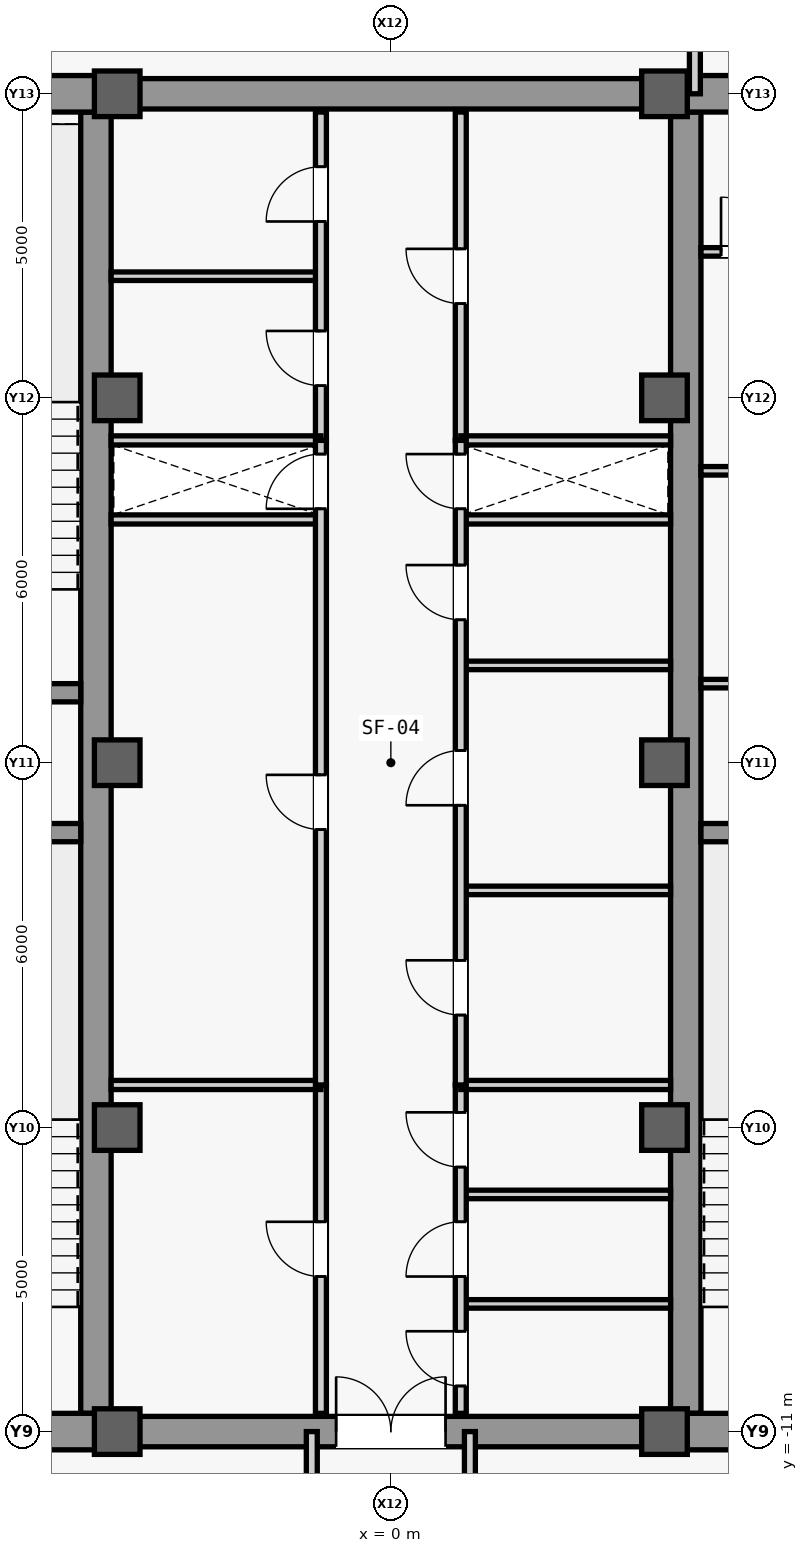
"""IFC4 building model, lengths in metres.
Left out: names, types, materials, properties, quantities, classifications, styles, units other than length and angle.
Written with IfcOpenShell. Run it as: python <this file> out.ifc"""

import sys

from ifc_helpers import new_model, si_unit, direction, frame, frame_2d, origin, origin_2d, place, context, subcontext, project, spatial, rectangle, extrude, source, transform, mapped, element, fill, save


model = new_model("IFC4")
c1 = context("Model", 3, precision=1e-05, world=origin(), true_north=direction((0.0, 1.0)))
c2 = subcontext(c1, "Body", "Model", "MODEL_VIEW")
j1 = project(units=[si_unit("LENGTHUNIT", "METRE"), si_unit("PLANEANGLEUNIT", "RADIAN")], contexts=[c1])
p1 = place(None, origin())
s1 = spatial("IfcSite", under=j1, at=p1, CompositionType="ELEMENT")
p2 = place(p1, origin())
s2 = spatial("IfcBuilding", under=s1, at=p2, CompositionType="ELEMENT")
p3 = place(p2, frame((0.0, 0.0, 317.5)))
s3 = spatial("IfcBuildingStorey", under=s2, at=p3, CompositionType="ELEMENT", Elevation=317.5)
m1 = source(origin(), c2, "Body", "SweptSolid", [
    extrude(rectangle(XDim=21.4, YDim=0.5, at=frame_2d((10.7, 0.0))), origin(), (0.0, 0.0, 1.0), 3.78),
])
for number, where, z_axis, x_axis in (
    (1, (-4.85, -10.7, 0.0), (0.0, 0.0, 1.0), (0.0, 1.0, 0.0)),
    (2, (4.85, -10.7, 0.0), (0.0, 0.0, 1.0), (0.0, 1.0, 0.0)),
):
    element("IfcWall", number, at=place(p3, frame(where, z_axis=z_axis, x_axis=x_axis)), inside=s3, PredefinedType="SHEAR", context=c2, shape_type="MappedRepresentation", body=[
        mapped(m1, transform((0.0, 0.0, 0.0), scale=1.0)),
    ])
m2 = source(origin(), c2, "Body", "SweptSolid", [
    extrude(rectangle(XDim=5.9, YDim=0.6, at=frame_2d((2.95, 0.0))), origin(), (0.0, 0.0, 1.0), 3.78),
])
for number, where, z_axis, x_axis in (
    (3, (-10.75, -11.0, 0.0), (0.0, 0.0, 1.0), (1.0, 0.0, 0.0)),
    (4, (-10.75, 11.0, 0.0), (0.0, 0.0, 1.0), (1.0, 0.0, 0.0)),
    (5, (4.85, -11.0, 0.0), (0.0, 0.0, 1.0), (1.0, 0.0, 0.0)),
):
    element("IfcWall", number, at=place(p3, frame(where, z_axis=z_axis, x_axis=x_axis)), inside=s3, PredefinedType="SHEAR", context=c2, shape_type="MappedRepresentation", body=[
        mapped(m2, transform((0.0, 0.0, 0.0), scale=1.0)),
    ])
p4 = place(p3, frame((4.85, 11.0, 0.0), z_axis=(0.0, 0.0, 1.0), x_axis=(1.0, 0.0, 0.0)))
e6 = element("IfcWall", 6, at=p4, inside=s3, PredefinedType="SHEAR", context=c2, shape_type="MappedRepresentation", body=[
    mapped(m2, transform((0.0, 0.0, 0.0), scale=1.0)),
])
m3 = source(origin(), c2, "Body", "SweptSolid", [
    extrude(rectangle(XDim=1.05, YDim=2.2, at=frame_2d((0.525, 1.1))), frame((0.0, 0.31, 0.0), z_axis=(0.0, -1.0, 0.0), x_axis=(1.0, 0.0, 0.0)), (0.0, 0.0, 1.0), 0.62),
])
p5 = place(p4, frame((1.375, 0.0, 0.0)))
e7 = element("IfcOpeningElement", 7, at=p5, cuts=e6, PredefinedType="OPENING", context=c2, shape_type="MappedRepresentation", body=[
    mapped(m3, transform((0.0, 0.0, 0.0), scale=1.0)),
])
m4 = source(origin(), c2, "Body", "SweptSolid", [
    extrude(rectangle(XDim=5.65, YDim=0.3, at=frame_2d((2.825, 0.0))), origin(), (0.0, 0.0, 1.0), 3.78),
])
for number, where, z_axis, x_axis in (
    (8, (-10.75, -1.15, 0.0), (0.0, 0.0, 1.0), (1.0, 0.0, 0.0)),
    (9, (-10.75, 1.15, 0.0), (0.0, 0.0, 1.0), (1.0, 0.0, 0.0)),
    (10, (5.1, -1.15, 0.0), (0.0, 0.0, 1.0), (1.0, 0.0, 0.0)),
):
    element("IfcWall", number, at=place(p3, frame(where, z_axis=z_axis, x_axis=x_axis)), inside=s3, PredefinedType="SHEAR", context=c2, shape_type="MappedRepresentation", body=[
        mapped(m4, transform((0.0, 0.0, 0.0), scale=1.0)),
    ])
m5 = source(origin(), c2, "Body", "SweptSolid", [
    extrude(rectangle(XDim=9.2, YDim=0.5, at=frame_2d((4.6, 0.0))), origin(), (0.0, 0.0, 1.0), 3.78),
])
p6 = place(p3, frame((-4.6, -11.0, 0.0), z_axis=(0.0, 0.0, 1.0), x_axis=(1.0, 0.0, 0.0)))
e11 = element("IfcWall", 11, at=p6, inside=s3, PredefinedType="SHEAR", context=c2, shape_type="MappedRepresentation", body=[
    mapped(m5, transform((0.0, 0.0, 0.0), scale=1.0)),
])
m6 = source(origin(), c2, "Body", "SweptSolid", [
    extrude(rectangle(XDim=1.8, YDim=2.25, at=frame_2d((0.9, 1.125))), frame((0.0, 0.26, 0.0), z_axis=(0.0, -1.0, 0.0), x_axis=(1.0, 0.0, 0.0)), (0.0, 0.0, 1.0), 0.52),
])
p7 = place(p6, frame((3.7, 0.0, 0.0)))
e12 = element("IfcOpeningElement", 12, at=p7, cuts=e11, PredefinedType="OPENING", context=c2, shape_type="MappedRepresentation", body=[
    mapped(m6, transform((0.0, 0.0, 0.0), scale=1.0)),
])
p8 = place(p3, frame((-4.6, 11.0, 0.0), z_axis=(0.0, 0.0, 1.0), x_axis=(1.0, 0.0, 0.0)))
e13 = element("IfcWall", 13, at=p8, inside=s3, PredefinedType="SHEAR", context=c2, shape_type="MappedRepresentation", body=[
    mapped(m5, transform((0.0, 0.0, 0.0), scale=1.0)),
])
m7 = source(origin(), c2, "Body", "SweptSolid", [
    extrude(rectangle(XDim=0.75, YDim=0.75, at=origin_2d()), origin(), (0.0, 0.0, 1.0), 4.0),
])
for number, where, z_axis, x_axis in (
    (14, (-4.5, -11.0, 0.0), (0.0, 0.0, 1.0), (1.0, 0.0, 0.0)),
    (15, (-4.5, -6.0, 0.0), (0.0, 0.0, 1.0), (1.0, 0.0, 0.0)),
    (16, (-4.5, 0.0, 0.0), (0.0, 0.0, 1.0), (1.0, 0.0, 0.0)),
    (17, (-4.5, 6.0, 0.0), (0.0, 0.0, 1.0), (1.0, 0.0, 0.0)),
    (18, (-4.5, 11.0, 0.0), (0.0, 0.0, 1.0), (1.0, 0.0, 0.0)),
    (19, (4.5, -11.0, 0.0), (0.0, 0.0, 1.0), (1.0, 0.0, 0.0)),
    (20, (4.5, -6.0, 0.0), (0.0, 0.0, 1.0), (1.0, 0.0, 0.0)),
    (21, (4.5, 0.0, 0.0), (0.0, 0.0, 1.0), (1.0, 0.0, 0.0)),
    (22, (4.5, 6.0, 0.0), (0.0, 0.0, 1.0), (1.0, 0.0, 0.0)),
    (23, (4.5, 11.0, 0.0), (0.0, 0.0, 1.0), (1.0, 0.0, 0.0)),
):
    element("IfcColumn", number, at=place(p3, frame(where, z_axis=z_axis, x_axis=x_axis)), inside=s3, PredefinedType="COLUMN", context=c2, shape_type="MappedRepresentation", body=[
        mapped(m7, transform((0.0, 0.0, 0.0), scale=1.0)),
    ])
m8 = source(origin(), c2, "Body", "SweptSolid", [
    extrude(rectangle(XDim=3.15, YDim=0.14, at=frame_2d((1.575, 0.0))), origin(), (0.0, 0.0, 1.0), 3.78),
])
p9 = place(p3, frame((5.1, 1.3, 0.0), z_axis=(0.0, 0.0, 1.0), x_axis=(1.0, 0.0, 0.0)))
e24 = element("IfcWall", 24, at=p9, inside=s3, PredefinedType="PARTITIONING", context=c2, shape_type="MappedRepresentation", body=[
    mapped(m8, transform((0.0, 0.0, 0.0), scale=1.0)),
])
p10 = place(p3, frame((5.1, 8.4, 0.0), z_axis=(0.0, 0.0, 1.0), x_axis=(1.0, 0.0, 0.0)))
e25 = element("IfcWall", 25, at=p10, inside=s3, PredefinedType="PARTITIONING", context=c2, shape_type="MappedRepresentation", body=[
    mapped(m8, transform((0.0, 0.0, 0.0), scale=1.0)),
])
m9 = source(origin(), c2, "Body", "SweptSolid", [
    extrude(rectangle(XDim=0.9, YDim=2.15, at=frame_2d((0.45, 1.075))), frame((0.0, 0.08, 0.0), z_axis=(0.0, -1.0, 0.0), x_axis=(1.0, 0.0, 0.0)), (0.0, 0.0, 1.0), 0.16),
])
p11 = place(p10, frame((0.33, 0.0, 0.0)))
e26 = element("IfcOpeningElement", 26, at=p11, cuts=e25, PredefinedType="OPENING", context=c2, shape_type="MappedRepresentation", body=[
    mapped(m9, transform((0.0, 0.0, 0.0), scale=1.0)),
])
p12 = place(p10, frame((1.9, 0.0, 0.0)))
e27 = element("IfcOpeningElement", 27, at=p12, cuts=e25, PredefinedType="OPENING", context=c2, shape_type="MappedRepresentation", body=[
    mapped(m9, transform((0.0, 0.0, 0.0), scale=1.0)),
])
m10 = source(origin(), c2, "Body", "SweptSolid", [
    extrude(rectangle(XDim=1.55, YDim=0.14, at=frame_2d((0.775, 0.0))), origin(), (0.0, 0.0, 1.0), 3.78),
])
p13 = place(p3, frame((5.1, 4.8, 0.0), z_axis=(0.0, 0.0, 1.0), x_axis=(1.0, 0.0, 0.0)))
e28 = element("IfcWall", 28, at=p13, inside=s3, PredefinedType="PARTITIONING", context=c2, shape_type="MappedRepresentation", body=[
    mapped(m10, transform((0.0, 0.0, 0.0), scale=1.0)),
])
m11 = source(origin(), c2, "Body", "SweptSolid", [
    extrude(rectangle(XDim=3.45, YDim=0.15, at=frame_2d((1.725, 0.0))), origin(), (0.0, 0.0, 1.0), 3.78),
])
for number, where, z_axis, x_axis in (
    (29, (-4.6, 4.0, 0.0), (0.0, 0.0, 1.0), (1.0, 0.0, 0.0)),
    (30, (1.15, 4.0, 0.0), (0.0, 0.0, 1.0), (1.0, 0.0, 0.0)),
):
    element("IfcWall", number, at=place(p3, frame(where, z_axis=z_axis, x_axis=x_axis)), inside=s3, PredefinedType="PARTITIONING", context=c2, shape_type="MappedRepresentation", body=[
        mapped(m11, transform((0.0, 0.0, 0.0), scale=1.0)),
    ])
m12 = source(origin(), c2, "Body", "SweptSolid", [
    extrude(rectangle(XDim=5.4, YDim=0.18, at=frame_2d((2.7, 0.0))), origin(), (0.0, 0.0, 1.0), 3.78),
])
p14 = place(p3, frame((-1.15, -10.7, 0.0), z_axis=(0.0, 0.0, 1.0), x_axis=(0.0, 1.0, 0.0)))
e31 = element("IfcWall", 31, at=p14, inside=s3, PredefinedType="PARTITIONING", context=c2, shape_type="MappedRepresentation", body=[
    mapped(m12, transform((0.0, 0.0, 0.0), scale=1.0)),
])
m13 = source(origin(), c2, "Body", "SweptSolid", [
    extrude(rectangle(XDim=0.9, YDim=2.15, at=frame_2d((0.45, 1.075))), frame((0.0, 0.1, 0.0), z_axis=(0.0, -1.0, 0.0), x_axis=(1.0, 0.0, 0.0)), (0.0, 0.0, 1.0), 0.2),
])
p15 = place(p14, frame((2.25, 0.0, 0.0)))
e32 = element("IfcOpeningElement", 32, at=p15, cuts=e31, PredefinedType="OPENING", context=c2, shape_type="MappedRepresentation", body=[
    mapped(m13, transform((0.0, 0.0, 0.0), scale=1.0)),
])
m14 = source(origin(), c2, "Body", "SweptSolid", [
    extrude(rectangle(XDim=3.45, YDim=0.14, at=frame_2d((1.725, 0.0))), origin(), (0.0, 0.0, 1.0), 3.78),
])
for number, where, z_axis, x_axis in (
    (33, (1.15, -8.9, 0.0), (0.0, 0.0, 1.0), (1.0, 0.0, 0.0)),
    (34, (1.15, -7.1, 0.0), (0.0, 0.0, 1.0), (1.0, 0.0, 0.0)),
):
    element("IfcWall", number, at=place(p3, frame(where, z_axis=z_axis, x_axis=x_axis)), inside=s3, PredefinedType="PARTITIONING", context=c2, shape_type="MappedRepresentation", body=[
        mapped(m14, transform((0.0, 0.0, 0.0), scale=1.0)),
    ])
p16 = place(p3, frame((1.15, -10.7, 0.0), z_axis=(0.0, 0.0, 1.0), x_axis=(0.0, 1.0, 0.0)))
e35 = element("IfcWall", 35, at=p16, inside=s3, PredefinedType="PARTITIONING", context=c2, shape_type="MappedRepresentation", body=[
    mapped(m12, transform((0.0, 0.0, 0.0), scale=1.0)),
])
p17 = place(p16, frame((0.45, 0.0, 0.0)))
e36 = element("IfcOpeningElement", 36, at=p17, cuts=e35, PredefinedType="OPENING", context=c2, shape_type="MappedRepresentation", body=[
    mapped(m13, transform((0.0, 0.0, 0.0), scale=1.0)),
])
p18 = place(p16, frame((2.25, 0.0, 0.0)))
e37 = element("IfcOpeningElement", 37, at=p18, cuts=e35, PredefinedType="OPENING", context=c2, shape_type="MappedRepresentation", body=[
    mapped(m13, transform((0.0, 0.0, 0.0), scale=1.0)),
])
p19 = place(p16, frame((4.05, 0.0, 0.0)))
e38 = element("IfcOpeningElement", 38, at=p19, cuts=e35, PredefinedType="OPENING", context=c2, shape_type="MappedRepresentation", body=[
    mapped(m13, transform((0.0, 0.0, 0.0), scale=1.0)),
])
for number, where, z_axis, x_axis in (
    (39, (-4.6, -5.3, 0.0), (0.0, 0.0, 1.0), (1.0, 0.0, 0.0)),
    (40, (1.15, -5.3, 0.0), (0.0, 0.0, 1.0), (1.0, 0.0, 0.0)),
):
    element("IfcWall", number, at=place(p3, frame(where, z_axis=z_axis, x_axis=x_axis)), inside=s3, PredefinedType="PARTITIONING", context=c2, shape_type="MappedRepresentation", body=[
        mapped(m11, transform((0.0, 0.0, 0.0), scale=1.0)),
    ])
p20 = place(p3, frame((-4.6, 8.0, 0.0), z_axis=(0.0, 0.0, 1.0), x_axis=(1.0, 0.0, 0.0)))
e41 = element("IfcWall", 41, at=p20, inside=s3, PredefinedType="PARTITIONING", context=c2, shape_type="MappedRepresentation", body=[
    mapped(m14, transform((0.0, 0.0, 0.0), scale=1.0)),
])
p21 = place(p3, frame((-1.15, 5.3, 0.0), z_axis=(0.0, 0.0, 1.0), x_axis=(0.0, 1.0, 0.0)))
e42 = element("IfcWall", 42, at=p21, inside=s3, PredefinedType="PARTITIONING", context=c2, shape_type="MappedRepresentation", body=[
    mapped(m12, transform((0.0, 0.0, 0.0), scale=1.0)),
])
p22 = place(p21, frame((0.9, 0.0, 0.0)))
e43 = element("IfcOpeningElement", 43, at=p22, cuts=e42, PredefinedType="OPENING", context=c2, shape_type="MappedRepresentation", body=[
    mapped(m13, transform((0.0, 0.0, 0.0), scale=1.0)),
])
p23 = place(p21, frame((3.6, 0.0, 0.0)))
e44 = element("IfcOpeningElement", 44, at=p23, cuts=e42, PredefinedType="OPENING", context=c2, shape_type="MappedRepresentation", body=[
    mapped(m13, transform((0.0, 0.0, 0.0), scale=1.0)),
])
p24 = place(p3, frame((1.15, 5.3, 0.0), z_axis=(0.0, 0.0, 1.0), x_axis=(0.0, 1.0, 0.0)))
e45 = element("IfcWall", 45, at=p24, inside=s3, PredefinedType="PARTITIONING", context=c2, shape_type="MappedRepresentation", body=[
    mapped(m12, transform((0.0, 0.0, 0.0), scale=1.0)),
])
p25 = place(p24, frame((2.25, 0.0, 0.0)))
e46 = element("IfcOpeningElement", 46, at=p25, cuts=e45, PredefinedType="OPENING", context=c2, shape_type="MappedRepresentation", body=[
    mapped(m13, transform((0.0, 0.0, 0.0), scale=1.0)),
])
for number, where, z_axis, x_axis in (
    (47, (-4.6, 5.3, 0.0), (0.0, 0.0, 1.0), (1.0, 0.0, 0.0)),
    (48, (1.15, 5.3, 0.0), (0.0, 0.0, 1.0), (1.0, 0.0, 0.0)),
):
    element("IfcWall", number, at=place(p3, frame(where, z_axis=z_axis, x_axis=x_axis)), inside=s3, PredefinedType="PARTITIONING", context=c2, shape_type="MappedRepresentation", body=[
        mapped(m11, transform((0.0, 0.0, 0.0), scale=1.0)),
    ])
m15 = source(origin(), c2, "Body", "SweptSolid", [
    extrude(rectangle(XDim=10.6, YDim=0.18, at=frame_2d((5.3, 0.0))), origin(), (0.0, 0.0, 1.0), 3.78),
])
p26 = place(p3, frame((-1.15, -5.3, 0.0), z_axis=(0.0, 0.0, 1.0), x_axis=(0.0, 1.0, 0.0)))
e49 = element("IfcWall", 49, at=p26, inside=s3, PredefinedType="PARTITIONING", context=c2, shape_type="MappedRepresentation", body=[
    mapped(m15, transform((0.0, 0.0, 0.0), scale=1.0)),
])
p27 = place(p26, frame((4.2, 0.0, 0.0)))
e50 = element("IfcOpeningElement", 50, at=p27, cuts=e49, PredefinedType="OPENING", context=c2, shape_type="MappedRepresentation", body=[
    mapped(m13, transform((0.0, 0.0, 0.0), scale=1.0)),
])
p28 = place(p26, frame((9.475, 0.0, 0.0)))
e51 = element("IfcOpeningElement", 51, at=p28, cuts=e49, PredefinedType="OPENING", context=c2, shape_type="MappedRepresentation", body=[
    mapped(m13, transform((0.0, 0.0, 0.0), scale=1.0)),
])
for number, where, z_axis, x_axis in (
    (52, (1.15, -2.1, 0.0), (0.0, 0.0, 1.0), (1.0, 0.0, 0.0)),
    (53, (1.15, 1.6, 0.0), (0.0, 0.0, 1.0), (1.0, 0.0, 0.0)),
):
    element("IfcWall", number, at=place(p3, frame(where, z_axis=z_axis, x_axis=x_axis)), inside=s3, PredefinedType="PARTITIONING", context=c2, shape_type="MappedRepresentation", body=[
        mapped(m14, transform((0.0, 0.0, 0.0), scale=1.0)),
    ])
p29 = place(p3, frame((1.15, -5.3, 0.0), z_axis=(0.0, 0.0, 1.0), x_axis=(0.0, 1.0, 0.0)))
e54 = element("IfcWall", 54, at=p29, inside=s3, PredefinedType="PARTITIONING", context=c2, shape_type="MappedRepresentation", body=[
    mapped(m15, transform((0.0, 0.0, 0.0), scale=1.0)),
])
p30 = place(p29, frame((1.15, 0.0, 0.0)))
e55 = element("IfcOpeningElement", 55, at=p30, cuts=e54, PredefinedType="OPENING", context=c2, shape_type="MappedRepresentation", body=[
    mapped(m13, transform((0.0, 0.0, 0.0), scale=1.0)),
])
p31 = place(p29, frame((4.6, 0.0, 0.0)))
e56 = element("IfcOpeningElement", 56, at=p31, cuts=e54, PredefinedType="OPENING", context=c2, shape_type="MappedRepresentation", body=[
    mapped(m13, transform((0.0, 0.0, 0.0), scale=1.0)),
])
p32 = place(p29, frame((7.65, 0.0, 0.0)))
e57 = element("IfcOpeningElement", 57, at=p32, cuts=e54, PredefinedType="OPENING", context=c2, shape_type="MappedRepresentation", body=[
    mapped(m13, transform((0.0, 0.0, 0.0), scale=1.0)),
])
p33 = place(p29, frame((9.475, 0.0, 0.0)))
e58 = element("IfcOpeningElement", 58, at=p33, cuts=e54, PredefinedType="OPENING", context=c2, shape_type="MappedRepresentation", body=[
    mapped(m13, transform((0.0, 0.0, 0.0), scale=1.0)),
])
m16 = source(origin(), c2, "Body", "SweptSolid", [
    extrude(rectangle(XDim=4.6, YDim=0.18, at=frame_2d((2.3, 0.0))), origin(), (0.0, 0.0, 1.0), 3.78),
])
for number, where, z_axis, x_axis in (
    (59, (-1.3, -15.6, 0.0), (0.0, 0.0, 1.0), (0.0, 1.0, 0.0)),
    (60, (1.3, -15.6, 0.0), (0.0, 0.0, 1.0), (0.0, 1.0, 0.0)),
):
    element("IfcWall", number, at=place(p3, frame(where, z_axis=z_axis, x_axis=x_axis)), inside=s3, PredefinedType="PARTITIONING", context=c2, shape_type="MappedRepresentation", body=[
        mapped(m16, transform((0.0, 0.0, 0.0), scale=1.0)),
    ])
m17 = source(origin(), c2, "Body", "SweptSolid", [
    extrude(rectangle(XDim=2.6, YDim=0.18, at=frame_2d((1.3, 0.0))), origin(), (0.0, 0.0, 1.0), 3.78),
])
p34 = place(p3, frame((5.0, 11.0, 0.0), z_axis=(0.0, 0.0, 1.0), x_axis=(0.0, 1.0, 0.0)))
e61 = element("IfcWall", 61, at=p34, inside=s3, PredefinedType="PARTITIONING", context=c2, shape_type="MappedRepresentation", body=[
    mapped(m17, transform((0.0, 0.0, 0.0), scale=1.0)),
])
p35 = place(p34, frame((0.85, 0.0, 0.0)))
e62 = element("IfcOpeningElement", 62, at=p35, cuts=e61, PredefinedType="OPENING", context=c2, shape_type="MappedRepresentation", body=[
    mapped(m13, transform((0.0, 0.0, 0.0), scale=1.0)),
])
m18 = source(origin(), c2, "Body", "SweptSolid", [
    extrude(rectangle(XDim=0.9, YDim=2.15, at=frame_2d((0.45, 1.075))), frame((0.0, 0.025, 0.0), z_axis=(0.0, -1.0, 0.0), x_axis=(1.0, 0.0, 0.0)), (0.0, 0.0, 1.0), 0.05),
])
p36 = place(p11, origin())
e63 = element("IfcDoor", 63, at=p36, inside=s3, OperationType="SINGLE_SWING_LEFT", PredefinedType="DOOR", context=c2, shape_type="MappedRepresentation", body=[
    mapped(m18, transform((0.0, 0.0, 0.0), scale=1.0)),
])
fill(e26, e63)
p37 = place(p15, origin())
e64 = element("IfcDoor", 64, at=p37, inside=s3, OperationType="SINGLE_SWING_RIGHT", PredefinedType="DOOR", context=c2, shape_type="MappedRepresentation", body=[
    mapped(m18, transform((0.0, 0.0, 0.0), scale=1.0)),
])
fill(e32, e64)
p38 = place(p17, origin())
e65 = element("IfcDoor", 65, at=p38, inside=s3, OperationType="SINGLE_SWING_RIGHT", PredefinedType="DOOR", context=c2, shape_type="MappedRepresentation", body=[
    mapped(m18, transform((0.0, 0.0, 0.0), scale=1.0)),
])
fill(e36, e65)
p39 = place(p18, origin())
e66 = element("IfcDoor", 66, at=p39, inside=s3, OperationType="SINGLE_SWING_LEFT", PredefinedType="DOOR", context=c2, shape_type="MappedRepresentation", body=[
    mapped(m18, transform((0.0, 0.0, 0.0), scale=1.0)),
])
fill(e37, e66)
p40 = place(p19, origin())
e67 = element("IfcDoor", 67, at=p40, inside=s3, OperationType="SINGLE_SWING_RIGHT", PredefinedType="DOOR", context=c2, shape_type="MappedRepresentation", body=[
    mapped(m18, transform((0.0, 0.0, 0.0), scale=1.0)),
])
fill(e38, e67)
m19 = source(origin(), c2, "Body", "SweptSolid", [
    extrude(rectangle(XDim=1.8, YDim=2.25, at=frame_2d((0.9, 1.125))), frame((0.0, 0.025, 0.0), z_axis=(0.0, -1.0, 0.0), x_axis=(1.0, 0.0, 0.0)), (0.0, 0.0, 1.0), 0.05),
])
p41 = place(p7, origin())
e68 = element("IfcDoor", 68, at=p41, inside=s3, OperationType="SINGLE_SWING_LEFT", PredefinedType="DOOR", context=c2, shape_type="MappedRepresentation", body=[
    mapped(m19, transform((0.0, 0.0, 0.0), scale=1.0)),
])
fill(e12, e68)
p42 = place(p22, origin())
e69 = element("IfcDoor", 69, at=p42, inside=s3, OperationType="SINGLE_SWING_RIGHT", PredefinedType="DOOR", context=c2, shape_type="MappedRepresentation", body=[
    mapped(m18, transform((0.0, 0.0, 0.0), scale=1.0)),
])
fill(e43, e69)
p43 = place(p23, origin())
e70 = element("IfcDoor", 70, at=p43, inside=s3, OperationType="SINGLE_SWING_LEFT", PredefinedType="DOOR", context=c2, shape_type="MappedRepresentation", body=[
    mapped(m18, transform((0.0, 0.0, 0.0), scale=1.0)),
])
fill(e44, e70)
p44 = place(p25, origin())
e71 = element("IfcDoor", 71, at=p44, inside=s3, OperationType="SINGLE_SWING_RIGHT", PredefinedType="DOOR", context=c2, shape_type="MappedRepresentation", body=[
    mapped(m18, transform((0.0, 0.0, 0.0), scale=1.0)),
])
fill(e46, e71)
p45 = place(p27, origin())
e72 = element("IfcDoor", 72, at=p45, inside=s3, OperationType="SINGLE_SWING_RIGHT", PredefinedType="DOOR", context=c2, shape_type="MappedRepresentation", body=[
    mapped(m18, transform((0.0, 0.0, 0.0), scale=1.0)),
])
fill(e50, e72)
p46 = place(p30, origin())
e73 = element("IfcDoor", 73, at=p46, inside=s3, OperationType="SINGLE_SWING_RIGHT", PredefinedType="DOOR", context=c2, shape_type="MappedRepresentation", body=[
    mapped(m18, transform((0.0, 0.0, 0.0), scale=1.0)),
])
fill(e55, e73)
p47 = place(p31, origin())
e74 = element("IfcDoor", 74, at=p47, inside=s3, OperationType="SINGLE_SWING_LEFT", PredefinedType="DOOR", context=c2, shape_type="MappedRepresentation", body=[
    mapped(m18, transform((0.0, 0.0, 0.0), scale=1.0)),
])
fill(e56, e74)
p48 = place(p32, origin())
e75 = element("IfcDoor", 75, at=p48, inside=s3, OperationType="SINGLE_SWING_RIGHT", PredefinedType="DOOR", context=c2, shape_type="MappedRepresentation", body=[
    mapped(m18, transform((0.0, 0.0, 0.0), scale=1.0)),
])
fill(e57, e75)
p49 = place(p28, origin())
e76 = element("IfcDoor", 76, at=p49, inside=s3, OperationType="SINGLE_SWING_LEFT", PredefinedType="DOOR", context=c2, shape_type="MappedRepresentation", body=[
    mapped(m18, transform((0.0, 0.0, 0.0), scale=1.0)),
])
fill(e51, e76)
p50 = place(p33, origin())
e77 = element("IfcDoor", 77, at=p50, inside=s3, OperationType="SINGLE_SWING_RIGHT", PredefinedType="DOOR", context=c2, shape_type="MappedRepresentation", body=[
    mapped(m18, transform((0.0, 0.0, 0.0), scale=1.0)),
])
fill(e58, e77)
save(model, sys.argv[1])
